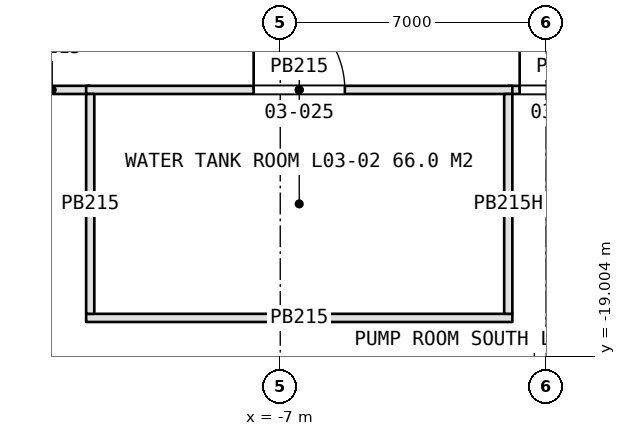
"""IFC4 building model, lengths in metres.
Left out: names, types, materials, properties, quantities, classifications, styles, units other than length and angle.
Written with IfcOpenShell. Run it as: python <this file> out.ifc"""

import sys

from ifc_helpers import new_model, si_unit, direction, frame, frame_2d, origin, place, context, subcontext, project, spatial, rectangle, extrude, element, fill, save


model = new_model("IFC4")
c1 = context("Model", 3, precision=1e-05, world=origin(), true_north=direction((0.0, 1.0)))
c2 = subcontext(c1, "Body", "Model", "MODEL_VIEW")
j1 = project(units=[si_unit("LENGTHUNIT", "METRE"), si_unit("PLANEANGLEUNIT", "RADIAN")], contexts=[c1])
p1 = place(None, origin())
s1 = spatial("IfcSite", under=j1, at=p1, CompositionType="ELEMENT")
p2 = place(p1, origin())
s2 = spatial("IfcBuilding", under=s1, at=p2, CompositionType="ELEMENT")
p3 = place(p2, frame((0.0, 0.0, 15.0)))
s3 = spatial("IfcBuildingStorey", under=s2, at=p3, CompositionType="ELEMENT", Elevation=15.0)
p4 = place(p3, frame((-14.0, -12.0, 0.0), z_axis=(0.0, 0.0, 1.0), x_axis=(1.0, 0.0, 0.0)))
e1 = element("IfcWall", 1, at=p4, inside=s3, PredefinedType="PARTITIONING", context=c2, shape_type="SweptSolid", body=[
    extrude(rectangle(XDim=2.0, YDim=0.215, at=frame_2d((1.0, 0.0))), origin(), (0.0, 0.0, 1.0), 4.2),
])
p5 = place(p3, frame((-1.0, -12.0, 0.0), z_axis=(0.0, 0.0, 1.0), x_axis=(1.0, 0.0, 0.0)))
e2 = element("IfcWall", 2, at=p5, inside=s3, PredefinedType="PARTITIONING", context=c2, shape_type="SweptSolid", body=[
    extrude(rectangle(XDim=3.0, YDim=0.215, at=frame_2d((1.5, 0.0))), origin(), (0.0, 0.0, 1.0), 4.2),
])
p6 = place(p5, frame((0.3, 0.0, 0.0)))
e3 = element("IfcOpeningElement", 3, at=p6, cuts=e2, PredefinedType="OPENING", context=c2, shape_type="SweptSolid", body=[
    extrude(rectangle(XDim=2.4, YDim=2.4, at=frame_2d((1.2, 1.2))), frame((0.0, 0.118, 0.0), z_axis=(0.0, -1.0, 0.0), x_axis=(1.0, 0.0, 0.0)), (0.0, 0.0, 1.0), 0.235),
])
p7 = place(p3, frame((-12.107, -18.0, 0.0), z_axis=(0.0, 0.0, 1.0), x_axis=(1.0, 0.0, 0.0)))
e4 = element("IfcWall", 4, at=p7, inside=s3, PredefinedType="PARTITIONING", context=c2, shape_type="SweptSolid", body=[
    extrude(rectangle(XDim=11.215, YDim=0.215, at=frame_2d((5.607, 0.0))), origin(), (0.0, 0.0, 1.0), 4.2),
])
p8 = place(p3, frame((-12.107, -12.0, 0.0), z_axis=(0.0, 0.0, 1.0), x_axis=(1.0, 0.0, 0.0)))
e5 = element("IfcWall", 5, at=p8, inside=s3, PredefinedType="PARTITIONING", context=c2, shape_type="SweptSolid", body=[
    extrude(rectangle(XDim=11.215, YDim=0.215, at=frame_2d((5.607, 0.0))), origin(), (0.0, 0.0, 1.0), 4.2),
])
p9 = place(p8, frame((4.407, 0.0, 0.0)))
e6 = element("IfcOpeningElement", 6, at=p9, cuts=e5, PredefinedType="OPENING", context=c2, shape_type="SweptSolid", body=[
    extrude(rectangle(XDim=2.4, YDim=2.4, at=frame_2d((1.2, 1.2))), frame((0.0, 0.118, 0.0), z_axis=(0.0, -1.0, 0.0), x_axis=(1.0, 0.0, 0.0)), (0.0, 0.0, 1.0), 0.235),
])
p10 = place(p3, frame((-12.0, -17.893, 0.0), z_axis=(0.0, 0.0, 1.0), x_axis=(0.0, 1.0, 0.0)))
e7 = element("IfcWall", 7, at=p10, inside=s3, PredefinedType="PARTITIONING", context=c2, shape_type="SweptSolid", body=[
    extrude(rectangle(XDim=5.785, YDim=0.215, at=frame_2d((2.893, 0.0))), origin(), (0.0, 0.0, 1.0), 4.2),
])
p11 = place(p3, frame((-1.0, -17.893, 0.0), z_axis=(0.0, 0.0, 1.0), x_axis=(0.0, 1.0, 0.0)))
e8 = element("IfcWall", 8, at=p11, inside=s3, PredefinedType="PARTITIONING", context=c2, shape_type="SweptSolid", body=[
    extrude(rectangle(XDim=5.785, YDim=0.215, at=frame_2d((2.893, 0.0))), origin(), (0.0, 0.0, 1.0), 3.873),
])
p12 = place(p9, origin())
e9 = element("IfcDoor", 9, at=p12, inside=s3, OperationType="DOUBLE_DOOR_SINGLE_SWING", PredefinedType="DOOR", context=c2, shape_type="SweptSolid", body=[
    extrude(rectangle(XDim=2.4, YDim=2.4, at=frame_2d((1.2, 1.2))), frame((0.0, 0.025, 0.0), z_axis=(0.0, -1.0, 0.0), x_axis=(1.0, 0.0, 0.0)), (0.0, 0.0, 1.0), 0.05),
])
fill(e6, e9)
p13 = place(p6, origin())
e10 = element("IfcDoor", 10, at=p13, inside=s3, OperationType="DOUBLE_DOOR_SINGLE_SWING", PredefinedType="DOOR", context=c2, shape_type="SweptSolid", body=[
    extrude(rectangle(XDim=2.4, YDim=2.4, at=frame_2d((1.2, 1.2))), frame((0.0, 0.025, 0.0), z_axis=(0.0, -1.0, 0.0), x_axis=(1.0, 0.0, 0.0)), (0.0, 0.0, 1.0), 0.05),
])
fill(e3, e10)
save(model, sys.argv[1])
